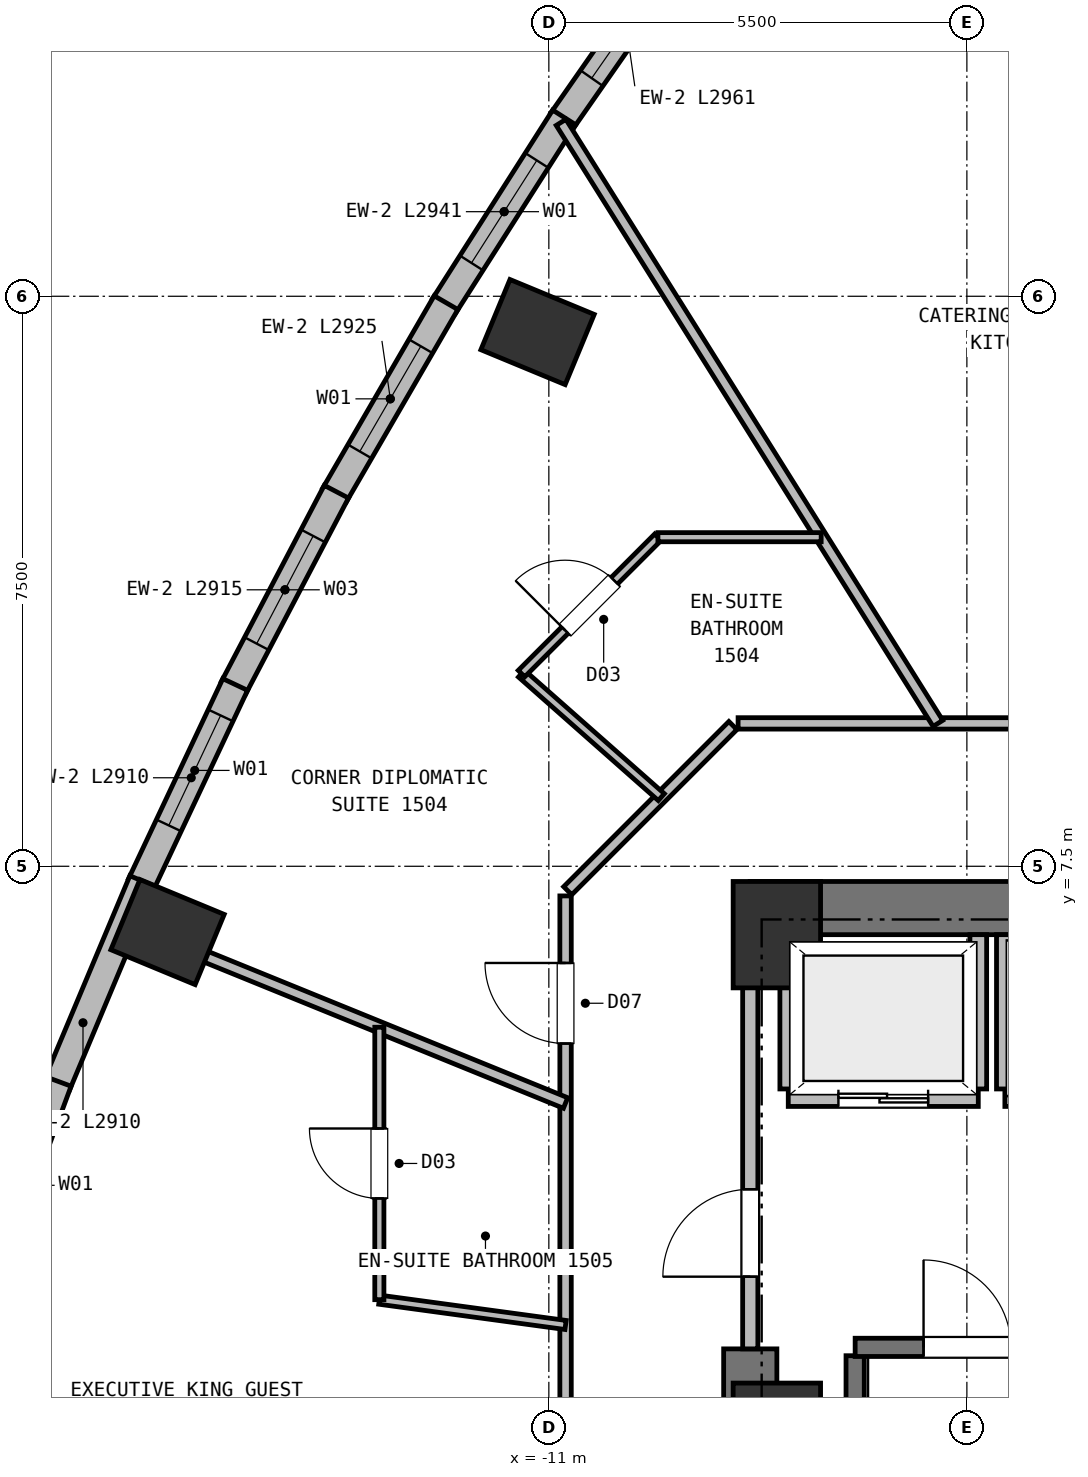
"""IFC4 building model, lengths in metres.
Left out: names, types, materials, properties, quantities, classifications, styles, units other than length and angle.
Written with IfcOpenShell. Run it as: python <this file> out.ifc"""

import sys

from ifc_helpers import new_model, si_unit, direction, frame, frame_2d, origin, origin_2d, place, context, subcontext, project, spatial, rectangle, extrude, element, fill, save


model = new_model("IFC4")
c1 = context("Model", 3, precision=1e-05, world=origin(), true_north=direction((0.0, 1.0)))
c2 = subcontext(c1, "Body", "Model", "MODEL_VIEW")
j1 = project(units=[si_unit("LENGTHUNIT", "METRE"), si_unit("PLANEANGLEUNIT", "RADIAN")], contexts=[c1])
p1 = place(None, origin())
s1 = spatial("IfcSite", under=j1, at=p1, CompositionType="ELEMENT")
p2 = place(p1, origin())
s2 = spatial("IfcBuilding", under=s1, at=p2, CompositionType="ELEMENT")
p3 = place(p2, frame((0.0, 0.0, 53.0)))
s3 = spatial("IfcBuildingStorey", under=s2, at=p3, CompositionType="ELEMENT", Elevation=53.0)
for number, where, z_axis, x_axis in (
    (1, (-8.0, 6.6, 0.0), (0.0, 0.0, 1.0), (1.0, 0.0, 0.0)),
    (2, (-8.0, 0.0, 0.0), (0.0, 0.0, 1.0), (1.0, 0.0, 0.0)),
):
    element("IfcColumn", number, at=place(p3, frame(where, z_axis=z_axis, x_axis=x_axis)), inside=s3, PredefinedType="COLUMN", context=c2, shape_type="SweptSolid", body=[
        extrude(rectangle(XDim=1.15, YDim=1.4, at=origin_2d()), origin(), (0.0, 0.0, 1.0), 3.75),
    ])
p4 = place(p3, frame((-8.35, 6.95, 0.0), z_axis=(0.0, 0.0, 1.0), x_axis=(1.0, 0.0, 0.0)))
e3 = element("IfcWall", 3, at=p4, inside=s3, PredefinedType="SHEAR", context=c2, shape_type="SweptSolid", body=[
    extrude(rectangle(XDim=16.7, YDim=0.7, at=frame_2d((8.35, 0.0))), origin(), (0.0, 0.0, 1.0), 3.5),
])
p5 = place(p3, frame((-8.35, -6.95, 0.0), z_axis=(0.0, 0.0, 1.0), x_axis=(0.0, 1.0, 0.0)))
e4 = element("IfcWall", 4, at=p5, inside=s3, PredefinedType="SHEAR", context=c2, shape_type="SweptSolid", body=[
    extrude(rectangle(XDim=8.1, YDim=0.7, at=frame_2d((4.05, 0.0))), origin(), (0.0, 0.0, 1.0), 3.5),
])
for number, where, z_axis, x_axis in (
    (5, (-11.148, 14.529, 0.0), (0.0, 0.0, 1.0), (0.383, 0.924, 0.0)),
    (6, (-16.017, 6.635, 0.0), (0.0, 0.0, 1.0), (0.383, 0.924, 0.0)),
):
    element("IfcColumn", number, at=place(p3, frame(where, z_axis=z_axis, x_axis=x_axis)), inside=s3, PredefinedType="COLUMN", context=c2, shape_type="SweptSolid", body=[
        extrude(rectangle(XDim=1.0, YDim=1.2, at=origin_2d()), origin(), (0.0, 0.0, 1.0), 3.75),
    ])
p6 = place(p3, frame((-10.826, 17.311, 0.0), z_axis=(0.0, 0.0, 1.0), x_axis=(0.572022980857, 0.820237593245, 0.0)))
e7 = element("IfcWall", 7, at=p6, inside=s3, PredefinedType="SOLIDWALL", context=c2, shape_type="SweptSolid", body=[
    extrude(rectangle(XDim=2.962, YDim=0.36, at=frame_2d((1.481, 0.0))), origin(), (0.0, 0.0, 1.0), 3.5),
])
p7 = place(p6, frame((0.681, 0.0, 0.72)))
e8 = element("IfcOpeningElement", 8, at=p7, cuts=e7, PredefinedType="OPENING", context=c2, shape_type="SweptSolid", body=[
    extrude(rectangle(XDim=1.6, YDim=1.88, at=frame_2d((0.8, 0.94))), frame((0.0, 0.19, 0.0), z_axis=(0.0, -1.0, 0.0), x_axis=(1.0, 0.0, 0.0)), (0.0, 0.0, 1.0), 0.38),
])
p8 = place(p3, frame((-12.378, 14.873, 0.0), z_axis=(0.0, 0.0, 1.0), x_axis=(0.537417887212, 0.843316082204, 0.0)))
e9 = element("IfcWall", 9, at=p8, inside=s3, PredefinedType="SOLIDWALL", context=c2, shape_type="SweptSolid", body=[
    extrude(rectangle(XDim=2.941, YDim=0.36, at=frame_2d((1.47, 0.0))), origin(), (0.0, 0.0, 1.0), 3.5),
])
p9 = place(p8, frame((0.67, 0.0, 0.72)))
e10 = element("IfcOpeningElement", 10, at=p9, cuts=e9, PredefinedType="OPENING", context=c2, shape_type="SweptSolid", body=[
    extrude(rectangle(XDim=1.6, YDim=1.88, at=frame_2d((0.8, 0.94))), frame((0.0, 0.19, 0.0), z_axis=(0.0, -1.0, 0.0), x_axis=(1.0, 0.0, 0.0)), (0.0, 0.0, 1.0), 0.38),
])
p10 = place(p3, frame((-13.82, 12.385, 0.0), z_axis=(0.0, 0.0, 1.0), x_axis=(0.501513234382, 0.865149972975, 0.0)))
e11 = element("IfcWall", 11, at=p10, inside=s3, PredefinedType="SOLIDWALL", context=c2, shape_type="SweptSolid", body=[
    extrude(rectangle(XDim=2.925, YDim=0.36, at=frame_2d((1.463, 0.0))), origin(), (0.0, 0.0, 1.0), 3.5),
])
p11 = place(p10, frame((0.663, 0.0, 0.72)))
e12 = element("IfcOpeningElement", 12, at=p11, cuts=e11, PredefinedType="OPENING", context=c2, shape_type="SweptSolid", body=[
    extrude(rectangle(XDim=1.6, YDim=1.88, at=frame_2d((0.8, 0.94))), frame((0.0, 0.19, 0.0), z_axis=(0.0, -1.0, 0.0), x_axis=(1.0, 0.0, 0.0)), (0.0, 0.0, 1.0), 0.38),
])
p12 = place(p3, frame((-15.149, 9.847, 0.0), z_axis=(0.0, 0.0, 1.0), x_axis=(0.464385677237, 0.885633074573, 0.0)))
e13 = element("IfcWall", 13, at=p12, inside=s3, PredefinedType="SOLIDWALL", context=c2, shape_type="SweptSolid", body=[
    extrude(rectangle(XDim=2.915, YDim=0.36, at=frame_2d((1.457, 0.0))), origin(), (0.0, 0.0, 1.0), 3.5),
])
p13 = place(p12, frame((0.657, 0.0, 0.72)))
e14 = element("IfcOpeningElement", 14, at=p13, cuts=e13, PredefinedType="OPENING", context=c2, shape_type="SweptSolid", body=[
    extrude(rectangle(XDim=1.6, YDim=1.88, at=frame_2d((0.8, 0.94))), frame((0.0, 0.19, 0.0), z_axis=(0.0, -1.0, 0.0), x_axis=(1.0, 0.0, 0.0)), (0.0, 0.0, 1.0), 0.38),
])
p14 = place(p3, frame((-16.367, 7.26, 0.0), z_axis=(0.0, 0.0, 1.0), x_axis=(0.426148545422, 0.904653202744, 0.0)))
e15 = element("IfcWall", 15, at=p14, inside=s3, PredefinedType="SOLIDWALL", context=c2, shape_type="SweptSolid", body=[
    extrude(rectangle(XDim=2.91, YDim=0.36, at=frame_2d((1.455, 0.0))), origin(), (0.0, 0.0, 1.0), 3.5),
])
p15 = place(p14, frame((0.86, 0.0, 0.72)))
e16 = element("IfcOpeningElement", 16, at=p15, cuts=e15, PredefinedType="OPENING", context=c2, shape_type="SweptSolid", body=[
    extrude(rectangle(XDim=1.6, YDim=1.88, at=frame_2d((0.8, 0.94))), frame((0.0, 0.19, 0.0), z_axis=(0.0, -1.0, 0.0), x_axis=(1.0, 0.0, 0.0)), (0.0, 0.0, 1.0), 0.38),
])
p16 = place(p3, frame((-17.473, 4.622, 0.0), z_axis=(0.0, 0.0, 1.0), x_axis=(0.387104109378, 0.922036012584, 0.0)))
e17 = element("IfcWall", 17, at=p16, inside=s3, PredefinedType="SOLIDWALL", context=c2, shape_type="SweptSolid", body=[
    extrude(rectangle(XDim=2.91, YDim=0.36, at=frame_2d((1.455, 0.0))), origin(), (0.0, 0.0, 1.0), 3.5),
])
p17 = place(p3, frame((-18.467, 1.936, 0.0), z_axis=(0.0, 0.0, 1.0), x_axis=(0.347513488828, 0.937674983714, 0.0)))
e18 = element("IfcWall", 18, at=p17, inside=s3, PredefinedType="SOLIDWALL", context=c2, shape_type="SweptSolid", body=[
    extrude(rectangle(XDim=2.915, YDim=0.36, at=frame_2d((1.458, 0.0))), origin(), (0.0, 0.0, 1.0), 3.5),
])
p18 = place(p17, frame((0.657, 0.0, 0.72)))
e19 = element("IfcOpeningElement", 19, at=p18, cuts=e18, PredefinedType="OPENING", context=c2, shape_type="SweptSolid", body=[
    extrude(rectangle(XDim=1.6, YDim=1.88, at=frame_2d((0.8, 0.94))), frame((0.0, 0.19, 0.0), z_axis=(0.0, -1.0, 0.0), x_axis=(1.0, 0.0, 0.0)), (0.0, 0.0, 1.0), 0.38),
])
p19 = place(p3, frame((-6.97, -6.16, 0.0), z_axis=(0.0, 0.0, 1.0), x_axis=(0.0, 1.0, 0.0)))
e20 = element("IfcWall", 20, at=p19, inside=s3, PredefinedType="SHEAR", context=c2, shape_type="SweptSolid", body=[
    extrude(rectangle(XDim=7.22, YDim=0.24, at=frame_2d((3.61, 0.0))), origin(), (0.0, 0.0, 1.0), 3.5),
])
p20 = place(p3, frame((-6.97, 1.17, 0.0), z_axis=(0.0, 0.0, 1.0), x_axis=(1.0, 0.0, 0.0)))
e21 = element("IfcWall", 21, at=p20, inside=s3, PredefinedType="SHEAR", context=c2, shape_type="SweptSolid", body=[
    extrude(rectangle(XDim=2.96, YDim=0.24, at=frame_2d((1.48, 0.0))), origin(), (0.0, 0.0, 1.0), 3.5),
])
p21 = place(p20, frame((0.9, 0.0, 0.0)))
e22 = element("IfcOpeningElement", 22, at=p21, cuts=e21, PredefinedType="OPENING", context=c2, shape_type="SweptSolid", body=[
    extrude(rectangle(XDim=1.15, YDim=2.15, at=frame_2d((0.575, 1.075))), frame((0.0, 0.13, 0.0), z_axis=(0.0, -1.0, 0.0), x_axis=(1.0, 0.0, 0.0)), (0.0, 0.0, 1.0), 0.26),
])
p22 = place(p3, frame((-7.85, 4.45, 0.0), z_axis=(0.0, 0.0, 1.0), x_axis=(1.0, 0.0, 0.0)))
e23 = element("IfcWall", 23, at=p22, inside=s3, PredefinedType="PARTITIONING", context=c2, shape_type="SweptSolid", body=[
    extrude(rectangle(XDim=2.5, YDim=0.22, at=frame_2d((1.25, 0.0))), origin(), (0.0, 0.0, 1.0), 3.5),
])
p23 = place(p22, frame((0.66, 0.0, 0.0)))
e24 = element("IfcOpeningElement", 24, at=p23, cuts=e23, PredefinedType="OPENING", context=c2, shape_type="SweptSolid", body=[
    extrude(rectangle(XDim=1.18, YDim=2.15, at=frame_2d((0.59, 1.075))), frame((0.0, 0.12, 0.0), z_axis=(0.0, -1.0, 0.0), x_axis=(1.0, 0.0, 0.0)), (0.0, 0.0, 1.0), 0.24),
])
p24 = place(p3, frame((-7.85, 4.57, 0.0), z_axis=(0.0, 0.0, 1.0), x_axis=(0.0, 1.0, 0.0)))
e25 = element("IfcWall", 25, at=p24, inside=s3, PredefinedType="PARTITIONING", context=c2, shape_type="SweptSolid", body=[
    extrude(rectangle(XDim=2.03, YDim=0.22, at=frame_2d((1.015, 0.0))), origin(), (0.0, 0.0, 1.0), 3.08),
])
p25 = place(p3, frame((-5.35, 4.57, 0.0), z_axis=(0.0, 0.0, 1.0), x_axis=(0.0, 1.0, 0.0)))
e26 = element("IfcWall", 26, at=p25, inside=s3, PredefinedType="PARTITIONING", context=c2, shape_type="SweptSolid", body=[
    extrude(rectangle(XDim=2.03, YDim=0.22, at=frame_2d((1.015, 0.0))), origin(), (0.0, 0.0, 1.0), 3.5),
])
p26 = place(p3, frame((-5.0, 4.45, 0.0), z_axis=(0.0, 0.0, 1.0), x_axis=(1.0, 0.0, 0.0)))
e27 = element("IfcWall", 27, at=p26, inside=s3, PredefinedType="PARTITIONING", context=c2, shape_type="SweptSolid", body=[
    extrude(rectangle(XDim=2.4, YDim=0.22, at=frame_2d((1.2, 0.0))), origin(), (0.0, 0.0, 1.0), 3.5),
])
p27 = place(p26, frame((0.28, 0.0, 0.0)))
e28 = element("IfcOpeningElement", 28, at=p27, cuts=e27, PredefinedType="OPENING", context=c2, shape_type="SweptSolid", body=[
    extrude(rectangle(XDim=1.22, YDim=2.15, at=frame_2d((0.61, 1.075))), frame((0.0, 0.12, 0.0), z_axis=(0.0, -1.0, 0.0), x_axis=(1.0, 0.0, 0.0)), (0.0, 0.0, 1.0), 0.24),
])
p28 = place(p3, frame((-5.0, 4.57, 0.0), z_axis=(0.0, 0.0, 1.0), x_axis=(0.0, 1.0, 0.0)))
e29 = element("IfcWall", 29, at=p28, inside=s3, PredefinedType="PARTITIONING", context=c2, shape_type="SweptSolid", body=[
    extrude(rectangle(XDim=2.03, YDim=0.22, at=frame_2d((1.015, 0.0))), origin(), (0.0, 0.0, 1.0), 3.5),
])
p29 = place(p3, frame((-8.35, 1.15, 0.0), z_axis=(0.0, 0.0, 1.0), x_axis=(0.0, 1.0, 0.0)))
e30 = element("IfcWall", 30, at=p29, inside=s3, PredefinedType="PARTITIONING", context=c2, shape_type="SweptSolid", body=[
    extrude(rectangle(XDim=5.4, YDim=0.2, at=frame_2d((2.7, 0.0))), origin(), (0.0, 0.0, 1.0), 3.5),
])
p30 = place(p29, frame((0.95, 0.0, 0.0)))
e31 = element("IfcOpeningElement", 31, at=p30, cuts=e30, PredefinedType="OPENING", context=c2, shape_type="SweptSolid", body=[
    extrude(rectangle(XDim=1.15, YDim=2.15, at=frame_2d((0.575, 1.075))), frame((0.0, 0.11, 0.0), z_axis=(0.0, -1.0, 0.0), x_axis=(1.0, 0.0, 0.0)), (0.0, 0.0, 1.0), 0.22),
])
p31 = place(p3, frame((-8.51, 9.38, 0.0), z_axis=(0.0, 0.0, 1.0), x_axis=(1.0, 0.0, 0.0)))
e32 = element("IfcWall", 32, at=p31, inside=s3, PredefinedType="PARTITIONING", context=c2, shape_type="SweptSolid", body=[
    extrude(rectangle(XDim=17.02, YDim=0.15, at=frame_2d((8.51, 0.0))), origin(), (0.0, 0.0, 1.0), 3.5),
])
p32 = place(p31, frame((4.674, 0.0, 0.0)))
e33 = element("IfcOpeningElement", 33, at=p32, cuts=e32, PredefinedType="OPENING", context=c2, shape_type="SweptSolid", body=[
    extrude(rectangle(XDim=1.0, YDim=2.15, at=frame_2d((0.5, 1.075))), frame((0.0, 0.085, 0.0), z_axis=(0.0, -1.0, 0.0), x_axis=(1.0, 0.0, 0.0)), (0.0, 0.0, 1.0), 0.17),
])
p33 = place(p31, frame((10.163, 0.0, 0.0)))
e34 = element("IfcOpeningElement", 34, at=p33, cuts=e32, PredefinedType="OPENING", context=c2, shape_type="SweptSolid", body=[
    extrude(rectangle(XDim=1.0, YDim=2.15, at=frame_2d((0.5, 1.075))), frame((0.0, 0.085, 0.0), z_axis=(0.0, -1.0, 0.0), x_axis=(1.0, 0.0, 0.0)), (0.0, 0.0, 1.0), 0.17),
])
p34 = place(p3, frame((-10.752, 7.178, 0.0), z_axis=(0.0, 0.0, 1.0), x_axis=(0.707067066127, 0.707146494016, 0.0)))
e35 = element("IfcWall", 35, at=p34, inside=s3, PredefinedType="PARTITIONING", context=c2, shape_type="SweptSolid", body=[
    extrude(rectangle(XDim=3.074, YDim=0.15, at=frame_2d((1.537, 0.0))), origin(), (0.0, 0.0, 1.0), 3.5),
])
p35 = place(p3, frame((-10.78, -7.11, 0.0), z_axis=(0.0, 0.0, 1.0), x_axis=(0.0, 1.0, 0.0)))
e36 = element("IfcWall", 36, at=p35, inside=s3, PredefinedType="PARTITIONING", context=c2, shape_type="SweptSolid", body=[
    extrude(rectangle(XDim=14.22, YDim=0.15, at=frame_2d((7.11, 0.0))), origin(), (0.0, 0.0, 1.0), 3.12),
])
p36 = place(p35, frame((12.278, 0.0, 0.0)))
e37 = element("IfcOpeningElement", 37, at=p36, cuts=e36, PredefinedType="OPENING", context=c2, shape_type="SweptSolid", body=[
    extrude(rectangle(XDim=1.06, YDim=2.15, at=frame_2d((0.53, 1.075))), frame((0.0, 0.085, 0.0), z_axis=(0.0, -1.0, 0.0), x_axis=(1.0, 0.0, 0.0)), (0.0, 0.0, 1.0), 0.17),
])
p37 = place(p35, frame((6.521, 0.0, 0.0)))
e38 = element("IfcOpeningElement", 38, at=p37, cuts=e36, PredefinedType="OPENING", context=c2, shape_type="SweptSolid", body=[
    extrude(rectangle(XDim=1.0, YDim=2.15, at=frame_2d((0.5, 1.075))), frame((0.0, 0.085, 0.0), z_axis=(0.0, -1.0, 0.0), x_axis=(1.0, 0.0, 0.0)), (0.0, 0.0, 1.0), 0.17),
])
p38 = place(p35, frame((0.813, 0.0, 0.0)))
e39 = element("IfcOpeningElement", 39, at=p38, cuts=e36, PredefinedType="OPENING", context=c2, shape_type="SweptSolid", body=[
    extrude(rectangle(XDim=1.06, YDim=2.15, at=frame_2d((0.53, 1.075))), frame((0.0, 0.085, 0.0), z_axis=(0.0, -1.0, 0.0), x_axis=(1.0, 0.0, 0.0)), (0.0, 0.0, 1.0), 0.17),
])
p39 = place(p3, frame((-5.881, 9.38, 0.0), z_axis=(0.0, 0.0, 1.0), x_axis=(-0.531202169705, 0.847245097301, 0.0)))
e40 = element("IfcWall", 40, at=p39, inside=s3, PredefinedType="PARTITIONING", context=c2, shape_type="SweptSolid", body=[
    extrude(rectangle(XDim=9.334, YDim=0.15, at=frame_2d((4.667, 0.0))), origin(), (0.0, 0.0, 1.0), 3.5),
])
p40 = place(p3, frame((-9.52, 8.41, 0.0), z_axis=(0.0, 0.0, 1.0), x_axis=(-0.749512689339, 0.661989976147, 0.0)))
e41 = element("IfcWall", 41, at=p40, inside=s3, PredefinedType="PARTITIONING", context=c2, shape_type="SweptSolid", body=[
    extrude(rectangle(XDim=2.455, YDim=0.12, at=frame_2d((1.228, 0.0))), origin(), (0.0, 0.0, 1.0), 3.5),
])
p41 = place(p3, frame((-11.36, 10.035, 0.0), z_axis=(0.0, 0.0, 1.0), x_axis=(0.707154859159, 0.707058699945, 0.0)))
e42 = element("IfcWall", 42, at=p41, inside=s3, PredefinedType="PARTITIONING", context=c2, shape_type="SweptSolid", body=[
    extrude(rectangle(XDim=2.539, YDim=0.12, at=frame_2d((1.27, 0.0))), origin(), (0.0, 0.0, 1.0), 3.5),
])
p42 = place(p41, frame((0.809, 0.0, 0.0)))
e43 = element("IfcOpeningElement", 43, at=p42, cuts=e42, PredefinedType="OPENING", context=c2, shape_type="SweptSolid", body=[
    extrude(rectangle(XDim=0.92, YDim=2.1, at=frame_2d((0.46, 1.05))), frame((0.0, 0.07, 0.0), z_axis=(0.0, -1.0, 0.0), x_axis=(1.0, 0.0, 0.0)), (0.0, 0.0, 1.0), 0.14),
])
p43 = place(p3, frame((-7.417, 11.83, 0.0), z_axis=(0.0, 0.0, 1.0), x_axis=(-1.0, 0.0, 0.0)))
e44 = element("IfcWall", 44, at=p43, inside=s3, PredefinedType="PARTITIONING", context=c2, shape_type="SweptSolid", body=[
    extrude(rectangle(XDim=2.147, YDim=0.12, at=frame_2d((1.074, 0.0))), origin(), (0.0, 0.0, 1.0), 3.5),
])
p44 = place(p3, frame((-10.78, 4.385, 0.0), z_axis=(0.0, 0.0, 1.0), x_axis=(-0.926285946265, 0.376821371146, 0.0)))
e45 = element("IfcWall", 45, at=p44, inside=s3, PredefinedType="PARTITIONING", context=c2, shape_type="SweptSolid", body=[
    extrude(rectangle(XDim=6.263, YDim=0.15, at=frame_2d((3.132, 0.0))), origin(), (0.0, 0.0, 1.0), 3.5),
])
p45 = place(p3, frame((-10.78, 1.465, 0.0), z_axis=(0.0, 0.0, 1.0), x_axis=(-0.990901533964, 0.134588818215, 0.0)))
e46 = element("IfcWall", 46, at=p45, inside=s3, PredefinedType="PARTITIONING", context=c2, shape_type="SweptSolid", body=[
    extrude(rectangle(XDim=2.472, YDim=0.12, at=frame_2d((1.236, 0.0))), origin(), (0.0, 0.0, 1.0), 3.5),
])
p46 = place(p3, frame((-13.23, 1.797, 0.0), z_axis=(0.0, 0.0, 1.0), x_axis=(0.0, 1.0, 0.0)))
e47 = element("IfcWall", 47, at=p46, inside=s3, PredefinedType="PARTITIONING", context=c2, shape_type="SweptSolid", body=[
    extrude(rectangle(XDim=3.585, YDim=0.12, at=frame_2d((1.792, 0.0))), origin(), (0.0, 0.0, 1.0), 3.5),
])
p47 = place(p46, frame((1.332, 0.0, 0.0)))
e48 = element("IfcOpeningElement", 48, at=p47, cuts=e47, PredefinedType="OPENING", context=c2, shape_type="SweptSolid", body=[
    extrude(rectangle(XDim=0.92, YDim=2.1, at=frame_2d((0.46, 1.05))), frame((0.0, 0.07, 0.0), z_axis=(0.0, -1.0, 0.0), x_axis=(1.0, 0.0, 0.0)), (0.0, 0.0, 1.0), 0.14),
])
p48 = place(p7, origin())
e49 = element("IfcWindow", 49, at=p48, inside=s3, PartitioningType="SINGLE_PANEL", PredefinedType="WINDOW", context=c2, shape_type="SweptSolid", body=[
    extrude(rectangle(XDim=1.6, YDim=1.88, at=frame_2d((0.8, 0.94))), frame((0.0, 0.03, 0.0), z_axis=(0.0, -1.0, 0.0), x_axis=(1.0, 0.0, 0.0)), (0.0, 0.0, 1.0), 0.06),
])
fill(e8, e49)
p49 = place(p9, origin())
e50 = element("IfcWindow", 50, at=p49, inside=s3, PartitioningType="SINGLE_PANEL", PredefinedType="WINDOW", context=c2, shape_type="SweptSolid", body=[
    extrude(rectangle(XDim=1.6, YDim=1.88, at=frame_2d((0.8, 0.94))), frame((0.0, 0.03, 0.0), z_axis=(0.0, -1.0, 0.0), x_axis=(1.0, 0.0, 0.0)), (0.0, 0.0, 1.0), 0.06),
])
fill(e10, e50)
p50 = place(p11, origin())
e51 = element("IfcWindow", 51, at=p50, inside=s3, PartitioningType="SINGLE_PANEL", PredefinedType="WINDOW", context=c2, shape_type="SweptSolid", body=[
    extrude(rectangle(XDim=1.6, YDim=1.88, at=frame_2d((0.8, 0.94))), frame((0.0, 0.03, 0.0), z_axis=(0.0, -1.0, 0.0), x_axis=(1.0, 0.0, 0.0)), (0.0, 0.0, 1.0), 0.06),
])
fill(e12, e51)
p51 = place(p13, origin())
e52 = element("IfcWindow", 52, at=p51, inside=s3, PartitioningType="SINGLE_PANEL", PredefinedType="WINDOW", context=c2, shape_type="SweptSolid", body=[
    extrude(rectangle(XDim=1.6, YDim=1.88, at=frame_2d((0.8, 0.94))), frame((0.0, 0.03, 0.0), z_axis=(0.0, -1.0, 0.0), x_axis=(1.0, 0.0, 0.0)), (0.0, 0.0, 1.0), 0.06),
])
fill(e14, e52)
p52 = place(p15, origin())
e53 = element("IfcWindow", 53, at=p52, inside=s3, PartitioningType="SINGLE_PANEL", PredefinedType="WINDOW", context=c2, shape_type="SweptSolid", body=[
    extrude(rectangle(XDim=1.6, YDim=1.88, at=frame_2d((0.8, 0.94))), frame((0.0, 0.03, 0.0), z_axis=(0.0, -1.0, 0.0), x_axis=(1.0, 0.0, 0.0)), (0.0, 0.0, 1.0), 0.06),
])
fill(e16, e53)
p53 = place(p21, origin())
e54 = element("IfcDoor", 54, at=p53, inside=s3, OperationType="SINGLE_SWING_LEFT", PredefinedType="DOOR", context=c2, shape_type="SweptSolid", body=[
    extrude(rectangle(XDim=1.15, YDim=2.15, at=frame_2d((0.575, 1.075))), frame((0.0, 0.025, 0.0), z_axis=(0.0, -1.0, 0.0), x_axis=(1.0, 0.0, 0.0)), (0.0, 0.0, 1.0), 0.05),
])
fill(e22, e54)
p54 = place(p23, origin())
e55 = element("IfcDoor", 55, at=p54, inside=s3, OperationType="DOUBLE_DOOR_SLIDING", PredefinedType="DOOR", context=c2, shape_type="SweptSolid", body=[
    extrude(rectangle(XDim=1.18, YDim=2.15, at=frame_2d((0.59, 1.075))), frame((0.0, 0.025, 0.0), z_axis=(0.0, -1.0, 0.0), x_axis=(1.0, 0.0, 0.0)), (0.0, 0.0, 1.0), 0.05),
])
fill(e24, e55)
p55 = place(p30, origin())
e56 = element("IfcDoor", 56, at=p55, inside=s3, OperationType="SINGLE_SWING_LEFT", PredefinedType="DOOR", context=c2, shape_type="SweptSolid", body=[
    extrude(rectangle(XDim=1.15, YDim=2.15, at=frame_2d((0.575, 1.075))), frame((0.0, 0.025, 0.0), z_axis=(0.0, -1.0, 0.0), x_axis=(1.0, 0.0, 0.0)), (0.0, 0.0, 1.0), 0.05),
])
fill(e31, e56)
p56 = place(p42, origin())
e57 = element("IfcDoor", 57, at=p56, inside=s3, OperationType="SINGLE_SWING_LEFT", PredefinedType="DOOR", context=c2, shape_type="SweptSolid", body=[
    extrude(rectangle(XDim=0.92, YDim=2.1, at=frame_2d((0.46, 1.05))), frame((0.0, 0.025, 0.0), z_axis=(0.0, -1.0, 0.0), x_axis=(1.0, 0.0, 0.0)), (0.0, 0.0, 1.0), 0.05),
])
fill(e43, e57)
p57 = place(p47, origin())
e58 = element("IfcDoor", 58, at=p57, inside=s3, OperationType="SINGLE_SWING_RIGHT", PredefinedType="DOOR", context=c2, shape_type="SweptSolid", body=[
    extrude(rectangle(XDim=0.92, YDim=2.1, at=frame_2d((0.46, 1.05))), frame((0.0, 0.025, 0.0), z_axis=(0.0, -1.0, 0.0), x_axis=(1.0, 0.0, 0.0)), (0.0, 0.0, 1.0), 0.05),
])
fill(e48, e58)
p58 = place(p36, origin())
e59 = element("IfcDoor", 59, at=p58, inside=s3, OperationType="SINGLE_SWING_RIGHT", PredefinedType="DOOR", context=c2, shape_type="SweptSolid", body=[
    extrude(rectangle(XDim=1.06, YDim=2.15, at=frame_2d((0.53, 1.075))), frame((0.0, 0.025, 0.0), z_axis=(0.0, -1.0, 0.0), x_axis=(1.0, 0.0, 0.0)), (0.0, 0.0, 1.0), 0.05),
])
fill(e37, e59)
save(model, sys.argv[1])
